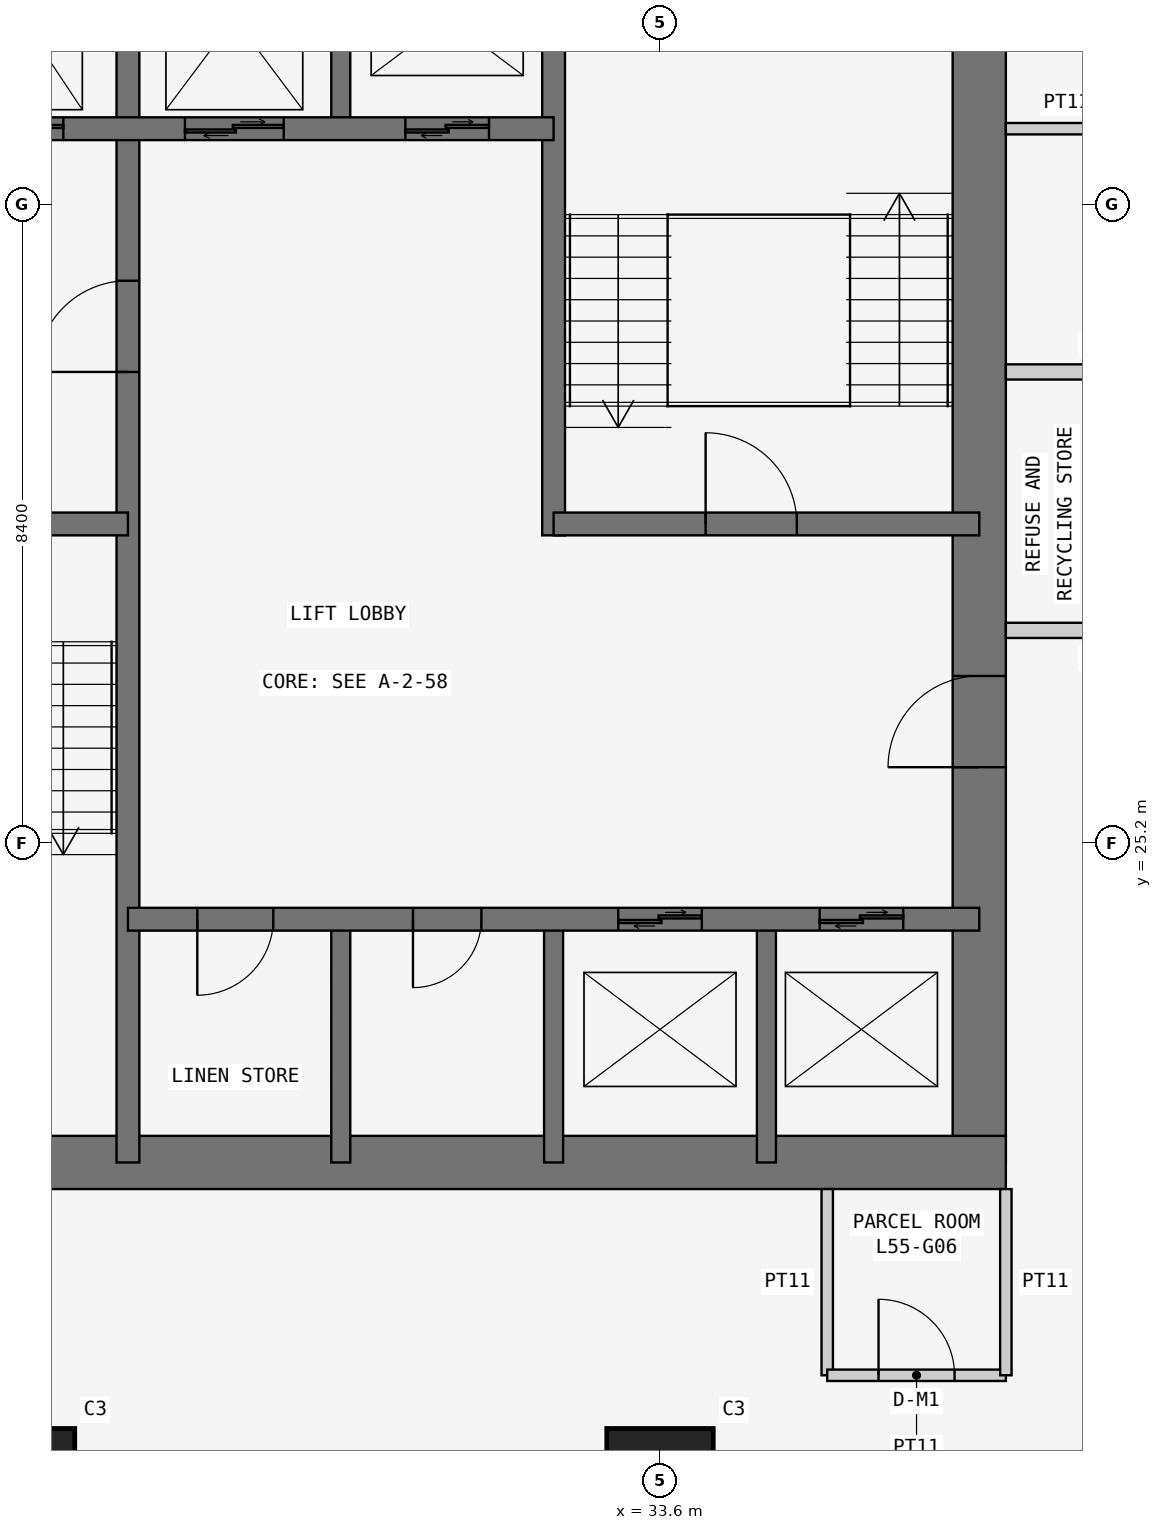
"""IFC4 building model, lengths in metres.
Left out: names, types, materials, properties, quantities, classifications, styles, units other than length and angle.
Written with IfcOpenShell. Run it as: python <this file> out.ifc"""

import sys

from ifc_helpers import new_model, si_unit, direction, frame, frame_2d, origin, origin_2d, place, context, subcontext, project, spatial, rectangle, extrude, element, fill, save


model = new_model("IFC4")
c1 = context("Model", 3, precision=1e-05, world=origin(), true_north=direction((0.0, 1.0)))
c2 = subcontext(c1, "Body", "Model", "MODEL_VIEW")
j1 = project(units=[si_unit("LENGTHUNIT", "METRE"), si_unit("PLANEANGLEUNIT", "RADIAN")], contexts=[c1])
p1 = place(None, origin())
s1 = spatial("IfcSite", under=j1, at=p1, CompositionType="ELEMENT")
p2 = place(p1, origin())
s2 = spatial("IfcBuilding", under=s1, at=p2, CompositionType="ELEMENT")
p3 = place(p2, frame((0.0, 0.0, 212.1)))
s3 = spatial("IfcBuildingStorey", under=s2, at=p3, CompositionType="ELEMENT", Elevation=212.1)
for number, where, z_axis, x_axis in (
    (1, (25.2, 16.8, 0.0), (0.0, 0.0, 1.0), (1.0, 0.0, 0.0)),
    (2, (33.6, 16.8, 0.0), (0.0, 0.0, 1.0), (1.0, 0.0, 0.0)),
):
    element("IfcColumn", number, at=place(p3, frame(where, z_axis=z_axis, x_axis=x_axis)), inside=s3, PredefinedType="COLUMN", context=c2, shape_type="SweptSolid", body=[
        extrude(rectangle(XDim=1.4, YDim=1.4, at=origin_2d()), origin(), (0.0, 0.0, 1.0), 3.6),
    ])
p4 = place(p3, frame((21.0, 21.0, 0.0), z_axis=(0.0, 0.0, 1.0), x_axis=(1.0, 0.0, 0.0)))
e3 = element("IfcWall", 3, at=p4, inside=s3, PredefinedType="SHEAR", context=c2, shape_type="SweptSolid", body=[
    extrude(rectangle(XDim=17.15, YDim=0.7, at=frame_2d((8.575, 0.0))), origin(), (0.0, 0.0, 1.0), 3.6),
])
p5 = place(p3, frame((37.8, 21.0, 0.0), z_axis=(0.0, 0.0, 1.0), x_axis=(0.0, 1.0, 0.0)))
e4 = element("IfcWall", 4, at=p5, inside=s3, PredefinedType="SHEAR", context=c2, shape_type="SweptSolid", body=[
    extrude(rectangle(XDim=17.15, YDim=0.7, at=frame_2d((8.575, 0.0))), origin(), (0.0, 0.0, 1.0), 3.6),
])
p6 = place(p5, frame((5.2, 0.0, 0.0)))
e5 = element("IfcOpeningElement", 5, at=p6, cuts=e4, PredefinedType="OPENING", context=c2, shape_type="SweptSolid", body=[
    extrude(rectangle(XDim=1.2, YDim=2.1, at=frame_2d((0.6, 1.05))), frame((0.0, 0.36, 0.0), z_axis=(0.0, -1.0, 0.0), x_axis=(1.0, 0.0, 0.0)), (0.0, 0.0, 1.0), 0.72),
])
p7 = place(p3, frame((26.6, 21.0, 0.0), z_axis=(0.0, 0.0, 1.0), x_axis=(0.0, 1.0, 0.0)))
e6 = element("IfcWall", 6, at=p7, inside=s3, PredefinedType="SHEAR", context=c2, shape_type="SweptSolid", body=[
    extrude(rectangle(XDim=16.8, YDim=0.3, at=frame_2d((8.4, 0.0))), origin(), (0.0, 0.0, 1.0), 3.6),
])
p8 = place(p7, frame((10.4, 0.0, 0.0)))
e7 = element("IfcOpeningElement", 7, at=p8, cuts=e6, PredefinedType="OPENING", context=c2, shape_type="SweptSolid", body=[
    extrude(rectangle(XDim=1.2, YDim=2.1, at=frame_2d((0.6, 1.05))), frame((0.0, 0.16, 0.0), z_axis=(0.0, -1.0, 0.0), x_axis=(1.0, 0.0, 0.0)), (0.0, 0.0, 1.0), 0.32),
])
p9 = place(p3, frame((21.0, 29.4, 0.0), z_axis=(0.0, 0.0, 1.0), x_axis=(1.0, 0.0, 0.0)))
e8 = element("IfcWall", 8, at=p9, inside=s3, PredefinedType="SHEAR", context=c2, shape_type="SweptSolid", body=[
    extrude(rectangle(XDim=5.6, YDim=0.3, at=frame_2d((2.8, 0.0))), origin(), (0.0, 0.0, 1.0), 3.6),
])
p10 = place(p9, frame((2.3, 0.0, 0.0)))
e9 = element("IfcOpeningElement", 9, at=p10, cuts=e8, PredefinedType="OPENING", context=c2, shape_type="SweptSolid", body=[
    extrude(rectangle(XDim=1.2, YDim=2.1, at=frame_2d((0.6, 1.05))), frame((0.0, 0.16, 0.0), z_axis=(0.0, -1.0, 0.0), x_axis=(1.0, 0.0, 0.0)), (0.0, 0.0, 1.0), 0.32),
])
p11 = place(p3, frame((21.0, 34.6, 0.0), z_axis=(0.0, 0.0, 1.0), x_axis=(1.0, 0.0, 0.0)))
e10 = element("IfcWall", 10, at=p11, inside=s3, PredefinedType="SHEAR", context=c2, shape_type="SweptSolid", body=[
    extrude(rectangle(XDim=11.2, YDim=0.3, at=frame_2d((5.6, 0.0))), origin(), (0.0, 0.0, 1.0), 3.6),
])
p12 = place(p11, frame((9.25, 0.0, 0.0)))
e11 = element("IfcOpeningElement", 11, at=p12, cuts=e10, PredefinedType="OPENING", context=c2, shape_type="SweptSolid", body=[
    extrude(rectangle(XDim=1.1, YDim=2.1, at=frame_2d((0.55, 1.05))), frame((0.0, 0.16, 0.0), z_axis=(0.0, -1.0, 0.0), x_axis=(1.0, 0.0, 0.0)), (0.0, 0.0, 1.0), 0.32),
])
p13 = place(p11, frame((1.0, 0.0, 0.0)))
e12 = element("IfcOpeningElement", 12, at=p13, cuts=e10, PredefinedType="OPENING", context=c2, shape_type="SweptSolid", body=[
    extrude(rectangle(XDim=1.1, YDim=2.1, at=frame_2d((0.55, 1.05))), frame((0.0, 0.16, 0.0), z_axis=(0.0, -1.0, 0.0), x_axis=(1.0, 0.0, 0.0)), (0.0, 0.0, 1.0), 0.32),
])
p14 = place(p11, frame((3.65, 0.0, 0.0)))
e13 = element("IfcOpeningElement", 13, at=p14, cuts=e10, PredefinedType="OPENING", context=c2, shape_type="SweptSolid", body=[
    extrude(rectangle(XDim=1.1, YDim=2.1, at=frame_2d((0.55, 1.05))), frame((0.0, 0.16, 0.0), z_axis=(0.0, -1.0, 0.0), x_axis=(1.0, 0.0, 0.0)), (0.0, 0.0, 1.0), 0.32),
])
p15 = place(p11, frame((6.35, 0.0, 0.0)))
e14 = element("IfcOpeningElement", 14, at=p15, cuts=e10, PredefinedType="OPENING", context=c2, shape_type="SweptSolid", body=[
    extrude(rectangle(XDim=1.3, YDim=2.1, at=frame_2d((0.65, 1.05))), frame((0.0, 0.16, 0.0), z_axis=(0.0, -1.0, 0.0), x_axis=(1.0, 0.0, 0.0)), (0.0, 0.0, 1.0), 0.32),
])
p16 = place(p3, frame((26.6, 24.2, 0.0), z_axis=(0.0, 0.0, 1.0), x_axis=(1.0, 0.0, 0.0)))
e15 = element("IfcWall", 15, at=p16, inside=s3, PredefinedType="SHEAR", context=c2, shape_type="SweptSolid", body=[
    extrude(rectangle(XDim=11.2, YDim=0.3, at=frame_2d((5.6, 0.0))), origin(), (0.0, 0.0, 1.0), 3.6),
])
p17 = place(p16, frame((0.913, 0.0, 0.0)))
e16 = element("IfcOpeningElement", 16, at=p17, cuts=e15, PredefinedType="OPENING", context=c2, shape_type="SweptSolid", body=[
    extrude(rectangle(XDim=1.0, YDim=2.1, at=frame_2d((0.5, 1.05))), frame((0.0, 0.16, 0.0), z_axis=(0.0, -1.0, 0.0), x_axis=(1.0, 0.0, 0.0)), (0.0, 0.0, 1.0), 0.32),
])
p18 = place(p16, frame((3.75, 0.0, 0.0)))
e17 = element("IfcOpeningElement", 17, at=p18, cuts=e15, PredefinedType="OPENING", context=c2, shape_type="SweptSolid", body=[
    extrude(rectangle(XDim=0.9, YDim=2.1, at=frame_2d((0.45, 1.05))), frame((0.0, 0.16, 0.0), z_axis=(0.0, -1.0, 0.0), x_axis=(1.0, 0.0, 0.0)), (0.0, 0.0, 1.0), 0.32),
])
p19 = place(p16, frame((6.45, 0.0, 0.0)))
e18 = element("IfcOpeningElement", 18, at=p19, cuts=e15, PredefinedType="OPENING", context=c2, shape_type="SweptSolid", body=[
    extrude(rectangle(XDim=1.1, YDim=2.1, at=frame_2d((0.55, 1.05))), frame((0.0, 0.16, 0.0), z_axis=(0.0, -1.0, 0.0), x_axis=(1.0, 0.0, 0.0)), (0.0, 0.0, 1.0), 0.32),
])
p20 = place(p16, frame((9.1, 0.0, 0.0)))
e19 = element("IfcOpeningElement", 19, at=p20, cuts=e15, PredefinedType="OPENING", context=c2, shape_type="SweptSolid", body=[
    extrude(rectangle(XDim=1.1, YDim=2.1, at=frame_2d((0.55, 1.05))), frame((0.0, 0.16, 0.0), z_axis=(0.0, -1.0, 0.0), x_axis=(1.0, 0.0, 0.0)), (0.0, 0.0, 1.0), 0.32),
])
p21 = place(p3, frame((32.2, 29.25, 0.0), z_axis=(0.0, 0.0, 1.0), x_axis=(0.0, 1.0, 0.0)))
e20 = element("IfcWall", 20, at=p21, inside=s3, PredefinedType="SHEAR", context=c2, shape_type="SweptSolid", body=[
    extrude(rectangle(XDim=8.55, YDim=0.3, at=frame_2d((4.275, 0.0))), origin(), (0.0, 0.0, 1.0), 3.6),
])
p22 = place(p3, frame((32.2, 29.4, 0.0), z_axis=(0.0, 0.0, 1.0), x_axis=(1.0, 0.0, 0.0)))
e21 = element("IfcWall", 21, at=p22, inside=s3, PredefinedType="SHEAR", context=c2, shape_type="SweptSolid", body=[
    extrude(rectangle(XDim=5.6, YDim=0.3, at=frame_2d((2.8, 0.0))), origin(), (0.0, 0.0, 1.0), 3.6),
])
p23 = place(p22, frame((2.0, 0.0, 0.0)))
e22 = element("IfcOpeningElement", 22, at=p23, cuts=e21, PredefinedType="OPENING", context=c2, shape_type="SweptSolid", body=[
    extrude(rectangle(XDim=1.2, YDim=2.1, at=frame_2d((0.6, 1.05))), frame((0.0, 0.16, 0.0), z_axis=(0.0, -1.0, 0.0), x_axis=(1.0, 0.0, 0.0)), (0.0, 0.0, 1.0), 0.32),
])
for number, where, z_axis, x_axis in (
    (23, (29.4, 21.0, 0.0), (0.0, 0.0, 1.0), (0.0, 1.0, 0.0)),
    (24, (32.2, 21.0, 0.0), (0.0, 0.0, 1.0), (0.0, 1.0, 0.0)),
    (25, (35.0, 21.0, 0.0), (0.0, 0.0, 1.0), (0.0, 1.0, 0.0)),
    (26, (29.4, 34.6, 0.0), (0.0, 0.0, 1.0), (0.0, 1.0, 0.0)),
):
    element("IfcWall", number, at=place(p3, frame(where, z_axis=z_axis, x_axis=x_axis)), inside=s3, PredefinedType="SHEAR", context=c2, shape_type="SweptSolid", body=[
        extrude(rectangle(XDim=3.2, YDim=0.25, at=frame_2d((1.6, 0.0))), origin(), (0.0, 0.0, 1.0), 3.6),
    ])
for number, where, z_axis, x_axis in (
    (27, (38.15, 28.0, 0.0), (0.0, 0.0, 1.0), (1.0, 0.0, 0.0)),
    (28, (40.6, 31.4, 0.0), (0.0, 0.0, 1.0), (-1.0, 0.0, 0.0)),
):
    element("IfcWall", number, at=place(p3, frame(where, z_axis=z_axis, x_axis=x_axis)), inside=s3, PredefinedType="PARTITIONING", context=c2, shape_type="SweptSolid", body=[
        extrude(rectangle(XDim=2.45, YDim=0.2, at=frame_2d((1.225, 0.0))), origin(), (0.0, 0.0, 1.0), 3.45),
    ])
p24 = place(p3, frame((38.15, 34.6, 0.0), z_axis=(0.0, 0.0, 1.0), x_axis=(1.0, 0.0, 0.0)))
e29 = element("IfcWall", 29, at=p24, inside=s3, PredefinedType="PARTITIONING", context=c2, shape_type="SweptSolid", body=[
    extrude(rectangle(XDim=1.6, YDim=0.15, at=frame_2d((0.8, 0.0))), origin(), (0.0, 0.0, 1.0), 3.45),
])
p25 = place(p3, frame((35.8, 20.65, 0.0), z_axis=(0.0, 0.0, 1.0), x_axis=(0.0, -1.0, 0.0)))
e30 = element("IfcWall", 30, at=p25, inside=s3, PredefinedType="PARTITIONING", context=c2, shape_type="SweptSolid", body=[
    extrude(rectangle(XDim=2.45, YDim=0.15, at=frame_2d((1.225, 0.0))), origin(), (0.0, 0.0, 1.0), 3.45),
])
p26 = place(p3, frame((35.8, 18.2, 0.0), z_axis=(0.0, 0.0, 1.0), x_axis=(1.0, 0.0, 0.0)))
e31 = element("IfcWall", 31, at=p26, inside=s3, PredefinedType="PARTITIONING", context=c2, shape_type="SweptSolid", body=[
    extrude(rectangle(XDim=2.35, YDim=0.15, at=frame_2d((1.175, 0.0))), origin(), (0.0, 0.0, 1.0), 3.45),
])
p27 = place(p26, frame((0.675, 0.0, 0.0)))
e32 = element("IfcOpeningElement", 32, at=p27, cuts=e31, PredefinedType="OPENING", context=c2, shape_type="SweptSolid", body=[
    extrude(rectangle(XDim=1.0, YDim=2.1, at=frame_2d((0.5, 1.05))), frame((0.0, 0.085, 0.0), z_axis=(0.0, -1.0, 0.0), x_axis=(1.0, 0.0, 0.0)), (0.0, 0.0, 1.0), 0.17),
])
p28 = place(p3, frame((38.15, 18.2, 0.0), z_axis=(0.0, 0.0, 1.0), x_axis=(0.0, 1.0, 0.0)))
e33 = element("IfcWall", 33, at=p28, inside=s3, PredefinedType="PARTITIONING", context=c2, shape_type="SweptSolid", body=[
    extrude(rectangle(XDim=2.45, YDim=0.15, at=frame_2d((1.225, 0.0))), origin(), (0.0, 0.0, 1.0), 3.45),
])
p29 = place(p27, origin())
e34 = element("IfcDoor", 34, at=p29, inside=s3, OperationType="SINGLE_SWING_LEFT", PredefinedType="DOOR", context=c2, shape_type="SweptSolid", body=[
    extrude(rectangle(XDim=1.0, YDim=2.1, at=frame_2d((0.5, 1.05))), frame((0.0, 0.025, 0.0), z_axis=(0.0, -1.0, 0.0), x_axis=(1.0, 0.0, 0.0)), (0.0, 0.0, 1.0), 0.05),
])
fill(e32, e34)
p30 = place(p8, origin())
e35 = element("IfcDoor", 35, at=p30, inside=s3, OperationType="SINGLE_SWING_LEFT", PredefinedType="DOOR", context=c2, shape_type="SweptSolid", body=[
    extrude(rectangle(XDim=1.2, YDim=2.1, at=frame_2d((0.6, 1.05))), frame((0.0, 0.025, 0.0), z_axis=(0.0, -1.0, 0.0), x_axis=(1.0, 0.0, 0.0)), (0.0, 0.0, 1.0), 0.05),
])
fill(e7, e35)
p31 = place(p6, origin())
e36 = element("IfcDoor", 36, at=p31, inside=s3, OperationType="SINGLE_SWING_LEFT", PredefinedType="DOOR", context=c2, shape_type="SweptSolid", body=[
    extrude(rectangle(XDim=1.2, YDim=2.1, at=frame_2d((0.6, 1.05))), frame((0.0, 0.025, 0.0), z_axis=(0.0, -1.0, 0.0), x_axis=(1.0, 0.0, 0.0)), (0.0, 0.0, 1.0), 0.05),
])
fill(e5, e36)
p32 = place(p23, origin())
e37 = element("IfcDoor", 37, at=p32, inside=s3, OperationType="SINGLE_SWING_LEFT", PredefinedType="DOOR", context=c2, shape_type="SweptSolid", body=[
    extrude(rectangle(XDim=1.2, YDim=2.1, at=frame_2d((0.6, 1.05))), frame((0.0, 0.025, 0.0), z_axis=(0.0, -1.0, 0.0), x_axis=(1.0, 0.0, 0.0)), (0.0, 0.0, 1.0), 0.05),
])
fill(e22, e37)
p33 = place(p17, frame((1.0, 0.0, 0.0), z_axis=(0.0, 0.0, 1.0), x_axis=(-1.0, 0.0, 0.0)))
e38 = element("IfcDoor", 38, at=p33, inside=s3, OperationType="SINGLE_SWING_RIGHT", PredefinedType="DOOR", context=c2, shape_type="SweptSolid", body=[
    extrude(rectangle(XDim=1.0, YDim=2.1, at=frame_2d((0.5, 1.05))), frame((0.0, 0.025, 0.0), z_axis=(0.0, -1.0, 0.0), x_axis=(1.0, 0.0, 0.0)), (0.0, 0.0, 1.0), 0.05),
])
fill(e16, e38)
p34 = place(p18, frame((0.9, 0.0, 0.0), z_axis=(0.0, 0.0, 1.0), x_axis=(-1.0, 0.0, 0.0)))
e39 = element("IfcDoor", 39, at=p34, inside=s3, OperationType="SINGLE_SWING_RIGHT", PredefinedType="DOOR", context=c2, shape_type="SweptSolid", body=[
    extrude(rectangle(XDim=0.9, YDim=2.1, at=frame_2d((0.45, 1.05))), frame((0.0, 0.025, 0.0), z_axis=(0.0, -1.0, 0.0), x_axis=(1.0, 0.0, 0.0)), (0.0, 0.0, 1.0), 0.05),
])
fill(e17, e39)
p35 = place(p19, origin())
e40 = element("IfcDoor", 40, at=p35, inside=s3, OperationType="DOUBLE_DOOR_SLIDING", PredefinedType="DOOR", context=c2, shape_type="SweptSolid", body=[
    extrude(rectangle(XDim=1.1, YDim=2.1, at=frame_2d((0.55, 1.05))), frame((0.0, 0.025, 0.0), z_axis=(0.0, -1.0, 0.0), x_axis=(1.0, 0.0, 0.0)), (0.0, 0.0, 1.0), 0.05),
])
fill(e18, e40)
p36 = place(p20, origin())
e41 = element("IfcDoor", 41, at=p36, inside=s3, OperationType="DOUBLE_DOOR_SLIDING", PredefinedType="DOOR", context=c2, shape_type="SweptSolid", body=[
    extrude(rectangle(XDim=1.1, YDim=2.1, at=frame_2d((0.55, 1.05))), frame((0.0, 0.025, 0.0), z_axis=(0.0, -1.0, 0.0), x_axis=(1.0, 0.0, 0.0)), (0.0, 0.0, 1.0), 0.05),
])
fill(e19, e41)
p37 = place(p12, origin())
e42 = element("IfcDoor", 42, at=p37, inside=s3, OperationType="DOUBLE_DOOR_SLIDING", PredefinedType="DOOR", context=c2, shape_type="SweptSolid", body=[
    extrude(rectangle(XDim=1.1, YDim=2.1, at=frame_2d((0.55, 1.05))), frame((0.0, 0.025, 0.0), z_axis=(0.0, -1.0, 0.0), x_axis=(1.0, 0.0, 0.0)), (0.0, 0.0, 1.0), 0.05),
])
fill(e11, e42)
p38 = place(p14, origin())
e43 = element("IfcDoor", 43, at=p38, inside=s3, OperationType="DOUBLE_DOOR_SLIDING", PredefinedType="DOOR", context=c2, shape_type="SweptSolid", body=[
    extrude(rectangle(XDim=1.1, YDim=2.1, at=frame_2d((0.55, 1.05))), frame((0.0, 0.025, 0.0), z_axis=(0.0, -1.0, 0.0), x_axis=(1.0, 0.0, 0.0)), (0.0, 0.0, 1.0), 0.05),
])
fill(e13, e43)
p39 = place(p15, origin())
e44 = element("IfcDoor", 44, at=p39, inside=s3, OperationType="DOUBLE_DOOR_SLIDING", PredefinedType="DOOR", context=c2, shape_type="SweptSolid", body=[
    extrude(rectangle(XDim=1.3, YDim=2.1, at=frame_2d((0.65, 1.05))), frame((0.0, 0.025, 0.0), z_axis=(0.0, -1.0, 0.0), x_axis=(1.0, 0.0, 0.0)), (0.0, 0.0, 1.0), 0.05),
])
fill(e14, e44)
save(model, sys.argv[1])
